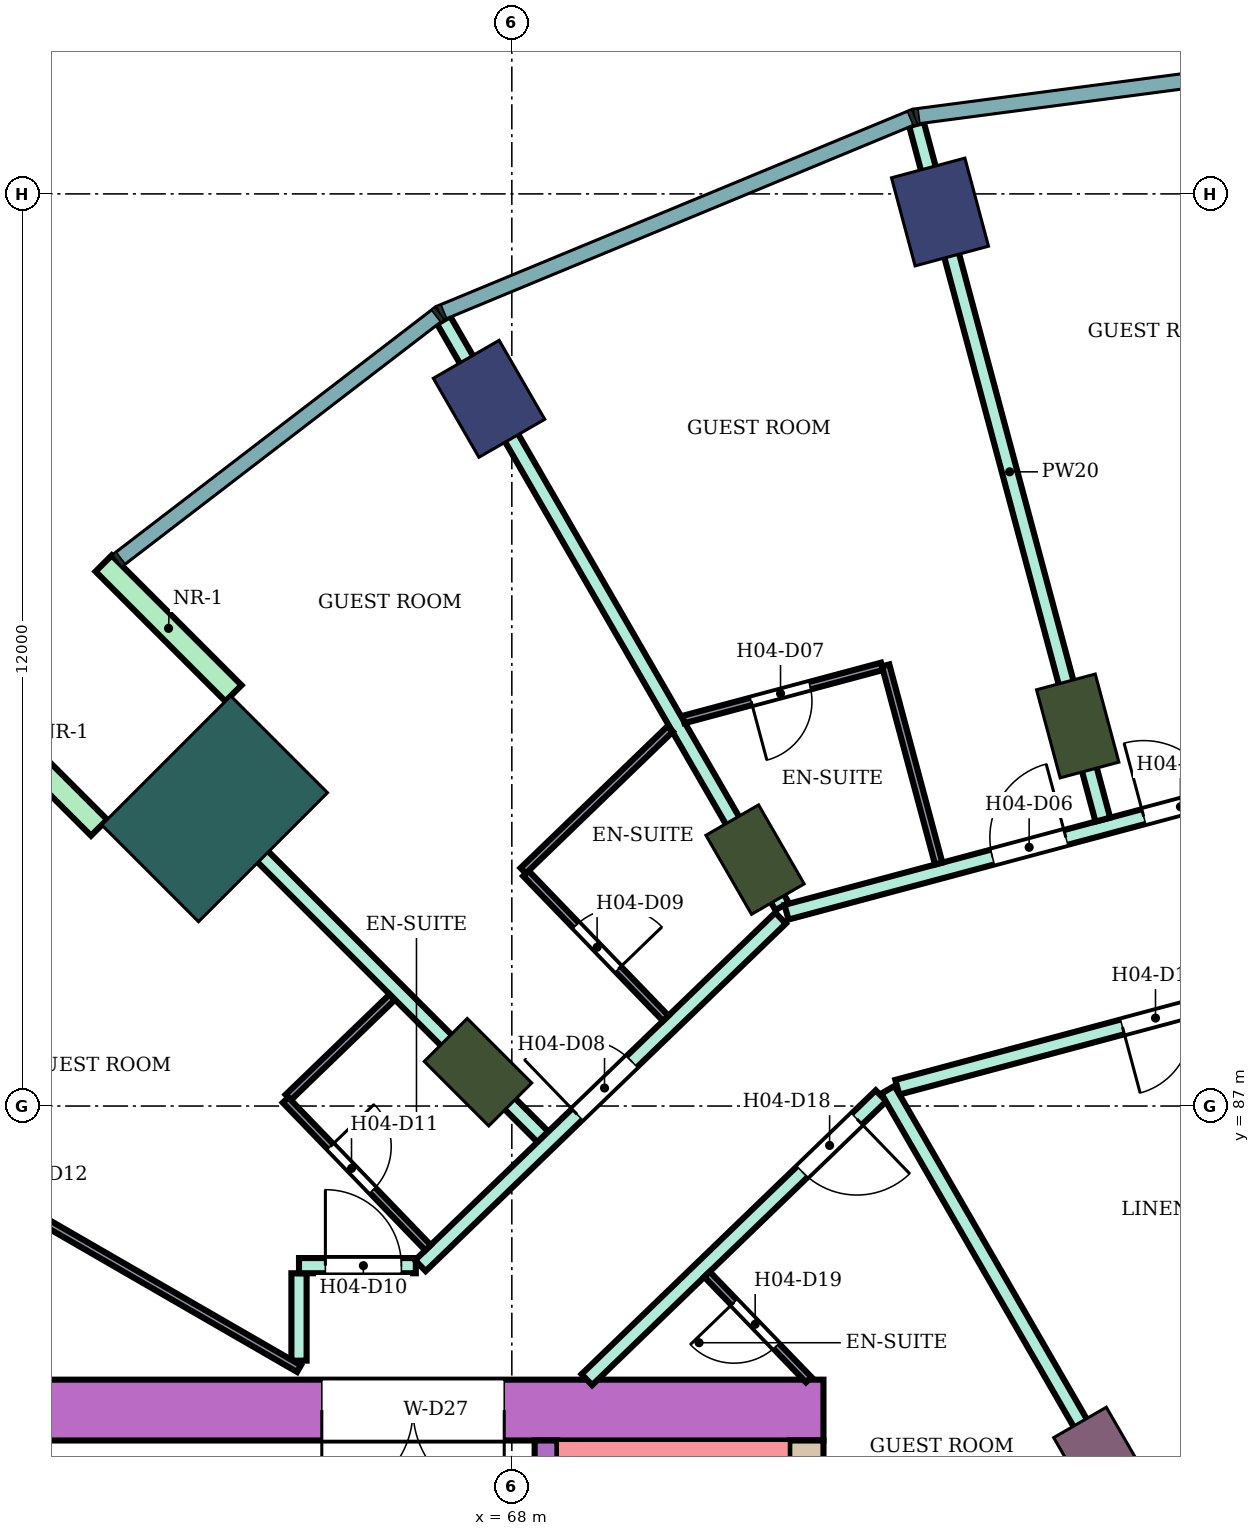
"""IFC4 building model, lengths in metres.
Left out: names, types, materials, properties, quantities, classifications, styles, units other than length and angle.
Written with IfcOpenShell. Run it as: python <this file> out.ifc"""

import sys

from ifc_helpers import new_model, si_unit, direction, frame, frame_2d, origin, origin_2d, place, context, subcontext, project, spatial, rectangle, extrude, element, fill, save


model = new_model("IFC4")
c1 = context("Model", 3, precision=1e-05, world=origin(), true_north=direction((0.0, 1.0)))
c2 = subcontext(c1, "Body", "Model", "MODEL_VIEW")
j1 = project(units=[si_unit("LENGTHUNIT", "METRE"), si_unit("PLANEANGLEUNIT", "RADIAN")], contexts=[c1])
p1 = place(None, origin())
s1 = spatial("IfcSite", under=j1, at=p1, CompositionType="ELEMENT")
p2 = place(p1, origin())
s2 = spatial("IfcBuilding", under=s1, at=p2, CompositionType="ELEMENT")
p3 = place(p2, frame((0.0, 0.0, 63.0)))
s3 = spatial("IfcBuildingStorey", under=s2, at=p3, CompositionType="ELEMENT", Elevation=63.0)
for number, where, z_axis, x_axis in (
    (1, (73.633, 98.762, 0.0), (0.0, 0.0, 1.0), (-0.259, 0.966, 0.0)),
    (2, (67.7, 96.304, 0.0), (0.0, 0.0, 1.0), (-0.5, 0.866, 0.0)),
):
    element("IfcColumn", number, at=place(p3, frame(where, z_axis=z_axis, x_axis=x_axis)), inside=s3, PredefinedType="COLUMN", context=c2, shape_type="SweptSolid", body=[
        extrude(rectangle(XDim=1.2, YDim=1.0, at=origin_2d()), origin(), (0.0, 0.0, 1.0), 3.8),
    ])
for number, where, z_axis, x_axis in (
    (3, (75.445, 92.0, 0.0), (0.0, 0.0, 1.0), (-0.259, 0.966, 0.0)),
    (4, (71.2, 90.242, 0.0), (0.0, 0.0, 1.0), (-0.5, 0.866, 0.0)),
    (5, (67.555, 87.445, 0.0), (0.0, 0.0, 1.0), (-0.707, 0.707, 0.0)),
):
    element("IfcColumn", number, at=place(p3, frame(where, z_axis=z_axis, x_axis=x_axis)), inside=s3, PredefinedType="COLUMN", context=c2, shape_type="SweptSolid", body=[
        extrude(rectangle(XDim=1.2, YDim=0.8, at=origin_2d()), origin(), (0.0, 0.0, 1.0), 3.8),
    ])
p4 = place(p3, frame((75.7, 82.448, 0.0), z_axis=(0.0, 0.0, 1.0), x_axis=(-0.5, 0.866025403784, 0.0)))
e6 = element("IfcColumn", 6, at=p4, inside=s3, PredefinedType="COLUMN", context=c2, shape_type="SweptSolid", body=[
    extrude(rectangle(XDim=0.9, YDim=0.8, at=origin_2d()), origin(), (0.0, 0.0, 1.0), 3.8),
])
p5 = place(p3, frame((64.09, 90.91, 0.0), z_axis=(0.0, 0.0, 1.0), x_axis=(-0.707106781187, 0.707106781187, 0.0)))
e7 = element("IfcColumn", 7, at=p5, inside=s3, PredefinedType="COLUMN", context=c2, shape_type="SweptSolid", body=[
    extrude(rectangle(XDim=1.8, YDim=2.4, at=origin_2d()), origin(), (0.0, 0.0, 1.0), 3.8),
])
p6 = place(p3, frame((72.1, 83.0, 0.0), z_axis=(0.0, 0.0, 1.0), x_axis=(-1.0, 0.0, 0.0)))
e8 = element("IfcWall", 8, at=p6, inside=s3, PredefinedType="SHEAR", context=c2, shape_type="SweptSolid", body=[
    extrude(rectangle(XDim=14.7, YDim=0.8, at=frame_2d((7.35, 0.0))), origin(), (0.0, 0.0, 1.0), 3.48),
])
p7 = place(p6, frame((4.2, 0.0, 0.0)))
e9 = element("IfcOpeningElement", 9, at=p7, cuts=e8, PredefinedType="OPENING", context=c2, shape_type="SweptSolid", body=[
    extrude(rectangle(XDim=2.4, YDim=2.4, at=frame_2d((1.2, 1.2))), frame((0.0, 0.41, 0.0), z_axis=(0.0, -1.0, 0.0), x_axis=(1.0, 0.0, 0.0)), (0.0, 0.0, 1.0), 0.82),
])
p8 = place(p3, frame((71.875, 82.6, 0.0), z_axis=(0.0, 0.0, 1.0), x_axis=(0.0, -1.0, 0.0)))
e10 = element("IfcWall", 10, at=p8, inside=s3, PredefinedType="SHEAR", context=c2, shape_type="SweptSolid", body=[
    extrude(rectangle(XDim=7.6, YDim=0.45, at=frame_2d((3.8, 0.0))), origin(), (0.0, 0.0, 1.0), 3.48),
])
p9 = place(p3, frame((68.45, 82.6, 0.0), z_axis=(0.0, 0.0, 1.0), x_axis=(0.0, -1.0, 0.0)))
e11 = element("IfcWall", 11, at=p9, inside=s3, PredefinedType="SHEAR", context=c2, shape_type="SweptSolid", body=[
    extrude(rectangle(XDim=7.6, YDim=0.3, at=frame_2d((3.8, 0.0))), origin(), (0.0, 0.0, 1.0), 3.48),
])
p10 = place(p9, frame((0.25, 0.0, 0.0)))
e12 = element("IfcOpeningElement", 12, at=p10, cuts=e11, PredefinedType="OPENING", context=c2, shape_type="SweptSolid", body=[
    extrude(rectangle(XDim=0.9, YDim=2.1, at=frame_2d((0.45, 1.05))), frame((0.0, 0.16, 0.0), z_axis=(0.0, -1.0, 0.0), x_axis=(1.0, 0.0, 0.0)), (0.0, 0.0, 1.0), 0.32),
])
for number, where, z_axis, x_axis in (
    (13, (64.338, 92.43, 0.0), (0.0, 0.0, 1.0), (-0.707, 0.707, 0.0)),
    (14, (62.57, 90.662, 0.0), (0.0, 0.0, 1.0), (-0.707, 0.707, 0.0)),
):
    element("IfcWall", number, at=place(p3, frame(where, z_axis=z_axis, x_axis=x_axis)), inside=s3, PredefinedType="NOTDEFINED", context=c2, shape_type="SweptSolid", body=[
        extrude(rectangle(XDim=2.416, YDim=0.3, at=frame_2d((1.208, 0.0))), origin(), (0.0, 0.0, 1.0), 3.8),
    ])
p11 = place(p3, frame((80.0, 82.604, 0.0), z_axis=(0.0, 0.0, 1.0), x_axis=(-0.965933654434, -0.258789828301, 0.0)))
e15 = element("IfcWall", 15, at=p11, inside=s3, PredefinedType="NOTDEFINED", context=c2, shape_type="SweptSolid", body=[
    extrude(rectangle(XDim=3.936, YDim=0.2, at=frame_2d((1.968, 0.0))), origin(), (0.0, 0.0, 1.0), 3.8),
])
p12 = place(p11, frame((0.468, 0.0, 0.9)))
e16 = element("IfcOpeningElement", 16, at=p12, cuts=e15, PredefinedType="OPENING", context=c2, shape_type="SweptSolid", body=[
    extrude(rectangle(XDim=3.0, YDim=2.3, at=frame_2d((1.5, 1.15))), frame((0.0, 0.11, 0.0), z_axis=(0.0, -1.0, 0.0), x_axis=(1.0, 0.0, 0.0)), (0.0, 0.0, 1.0), 0.22),
])
p13 = place(p3, frame((63.598, 91.407, 0.0), z_axis=(0.0, 0.0, 1.0), x_axis=(0.706981202484, -0.707232337591, 0.0)))
e17 = element("IfcWall", 17, at=p13, inside=s3, PredefinedType="PARTITIONING", context=c2, shape_type="SweptSolid", body=[
    extrude(rectangle(XDim=6.805, YDim=0.2, at=frame_2d((3.402, 0.0))), origin(), (0.0, 0.0, 1.0), 3.35),
])
p14 = place(p3, frame((65.2, 83.65, 0.0), z_axis=(0.0, 0.0, 1.0), x_axis=(0.0, 1.0, 0.0)))
e18 = element("IfcWall", 18, at=p14, inside=s3, PredefinedType="PARTITIONING", context=c2, shape_type="SweptSolid", body=[
    extrude(rectangle(XDim=1.15, YDim=0.2, at=frame_2d((0.575, 0.0))), origin(), (0.0, 0.0, 1.0), 3.35),
])
p15 = place(p3, frame((65.2, 84.9, 0.0), z_axis=(0.0, 0.0, 1.0), x_axis=(1.0, 0.0, 0.0)))
e19 = element("IfcWall", 19, at=p15, inside=s3, PredefinedType="PARTITIONING", context=c2, shape_type="SweptSolid", body=[
    extrude(rectangle(XDim=1.537, YDim=0.2, at=frame_2d((0.769, 0.0))), origin(), (0.0, 0.0, 1.0), 3.35),
])
p16 = place(p15, frame((0.347, 0.0, 0.0)))
e20 = element("IfcOpeningElement", 20, at=p16, cuts=e19, PredefinedType="OPENING", context=c2, shape_type="SweptSolid", body=[
    extrude(rectangle(XDim=1.0, YDim=2.1, at=frame_2d((0.5, 1.05))), frame((0.0, 0.11, 0.0), z_axis=(0.0, -1.0, 0.0), x_axis=(1.0, 0.0, 0.0)), (0.0, 0.0, 1.0), 0.22),
])
p17 = place(p3, frame((66.797, 84.9, 0.0), z_axis=(0.0, 0.0, 1.0), x_axis=(0.719692092412, 0.694293376116, 0.0)))
e21 = element("IfcWall", 21, at=p17, inside=s3, PredefinedType="PARTITIONING", context=c2, shape_type="SweptSolid", body=[
    extrude(rectangle(XDim=6.584, YDim=0.2, at=frame_2d((3.292, 0.0))), origin(), (0.0, 0.0, 1.0), 3.35),
])
p18 = place(p17, frame((2.866, 0.0, 0.0)))
e22 = element("IfcOpeningElement", 22, at=p18, cuts=e21, PredefinedType="OPENING", context=c2, shape_type="SweptSolid", body=[
    extrude(rectangle(XDim=1.0, YDim=2.1, at=frame_2d((0.5, 1.05))), frame((0.0, 0.11, 0.0), z_axis=(0.0, -1.0, 0.0), x_axis=(1.0, 0.0, 0.0)), (0.0, 0.0, 1.0), 0.22),
])
p19 = place(p3, frame((67.101, 97.342, 0.0), z_axis=(0.0, 0.0, 1.0), x_axis=(0.499932813297, -0.866064190571, 0.0)))
e23 = element("IfcWall", 23, at=p19, inside=s3, PredefinedType="PARTITIONING", context=c2, shape_type="SweptSolid", body=[
    extrude(rectangle(XDim=8.908, YDim=0.2, at=frame_2d((4.454, 0.0))), origin(), (0.0, 0.0, 1.0), 3.35),
])
p20 = place(p3, frame((68.987, 83.4, 0.0), z_axis=(0.0, 0.0, 1.0), x_axis=(0.719591503389, 0.694397629784, 0.0)))
e24 = element("IfcWall", 24, at=p20, inside=s3, PredefinedType="PARTITIONING", context=c2, shape_type="SweptSolid", body=[
    extrude(rectangle(XDim=5.378, YDim=0.2, at=frame_2d((2.689, 0.0))), origin(), (0.0, 0.0, 1.0), 3.35),
])
p21 = place(p20, frame((3.938, 0.0, 0.0)))
e25 = element("IfcOpeningElement", 25, at=p21, cuts=e24, PredefinedType="OPENING", context=c2, shape_type="SweptSolid", body=[
    extrude(rectangle(XDim=1.0, YDim=2.1, at=frame_2d((0.5, 1.05))), frame((0.0, 0.11, 0.0), z_axis=(0.0, -1.0, 0.0), x_axis=(1.0, 0.0, 0.0)), (0.0, 0.0, 1.0), 0.22),
])
p22 = place(p3, frame((71.614, 89.55, 0.0), z_axis=(0.0, 0.0, 1.0), x_axis=(0.965982156828, 0.258608725086, 0.0)))
e26 = element("IfcWall", 26, at=p22, inside=s3, PredefinedType="PARTITIONING", context=c2, shape_type="SweptSolid", body=[
    extrude(rectangle(XDim=8.592, YDim=0.2, at=frame_2d((4.296, 0.0))), origin(), (0.0, 0.0, 1.0), 3.35),
])
p23 = place(p22, frame((4.865, 0.0, 0.0)))
e27 = element("IfcOpeningElement", 27, at=p23, cuts=e26, PredefinedType="OPENING", context=c2, shape_type="SweptSolid", body=[
    extrude(rectangle(XDim=1.0, YDim=2.1, at=frame_2d((0.5, 1.05))), frame((0.0, 0.11, 0.0), z_axis=(0.0, -1.0, 0.0), x_axis=(1.0, 0.0, 0.0)), (0.0, 0.0, 1.0), 0.22),
])
p24 = place(p22, frame((2.804, 0.0, 0.0)))
e28 = element("IfcOpeningElement", 28, at=p24, cuts=e26, PredefinedType="OPENING", context=c2, shape_type="SweptSolid", body=[
    extrude(rectangle(XDim=1.0, YDim=2.1, at=frame_2d((0.5, 1.05))), frame((0.0, 0.11, 0.0), z_axis=(0.0, -1.0, 0.0), x_axis=(1.0, 0.0, 0.0)), (0.0, 0.0, 1.0), 0.22),
])
p25 = place(p3, frame((73.071, 87.247, 0.0), z_axis=(0.0, 0.0, 1.0), x_axis=(0.965914318977, 0.258861987157, 0.0)))
e29 = element("IfcWall", 29, at=p25, inside=s3, PredefinedType="PARTITIONING", context=c2, shape_type="SweptSolid", body=[
    extrude(rectangle(XDim=7.043, YDim=0.2, at=frame_2d((3.521, 0.0))), origin(), (0.0, 0.0, 1.0), 3.35),
])
p26 = place(p25, frame((3.067, 0.0, 0.0)))
e30 = element("IfcOpeningElement", 30, at=p26, cuts=e29, PredefinedType="OPENING", context=c2, shape_type="SweptSolid", body=[
    extrude(rectangle(XDim=0.9, YDim=2.1, at=frame_2d((0.45, 1.05))), frame((0.0, 0.11, 0.0), z_axis=(0.0, -1.0, 0.0), x_axis=(1.0, 0.0, 0.0)), (0.0, 0.0, 1.0), 0.22),
])
p27 = place(p3, frame((72.948, 87.214, 0.0), z_axis=(0.0, 0.0, 1.0), x_axis=(0.499927021214, -0.866067534006, 0.0)))
e31 = element("IfcWall", 31, at=p27, inside=s3, PredefinedType="PARTITIONING", context=c2, shape_type="SweptSolid", body=[
    extrude(rectangle(XDim=6.405, YDim=0.2, at=frame_2d((3.203, 0.0))), origin(), (0.0, 0.0, 1.0), 3.35),
])
p28 = place(p3, frame((73.323, 99.919, 0.0), z_axis=(0.0, 0.0, 1.0), x_axis=(0.258817230439, -0.965926312525, 0.0)))
e32 = element("IfcWall", 32, at=p28, inside=s3, PredefinedType="PARTITIONING", context=c2, shape_type="SweptSolid", body=[
    extrude(rectangle(XDim=9.474, YDim=0.2, at=frame_2d((4.737, 0.0))), origin(), (0.0, 0.0, 1.0), 3.35),
])
p29 = place(p3, frame((57.659, 87.899, 0.0), z_axis=(0.0, 0.0, 1.0), x_axis=(0.86602264145, -0.500004784474, 0.0)))
e33 = element("IfcWall", 33, at=p29, inside=s3, PredefinedType="PARTITIONING", context=c2, shape_type="SweptSolid", body=[
    extrude(rectangle(XDim=8.708, YDim=0.1, at=frame_2d((4.354, 0.0))), origin(), (0.0, 0.0, 1.0), 3.35),
])
p30 = place(p29, frame((3.929, 0.0, 0.0)))
e34 = element("IfcOpeningElement", 34, at=p30, cuts=e33, PredefinedType="OPENING", context=c2, shape_type="SweptSolid", body=[
    extrude(rectangle(XDim=0.9, YDim=2.1, at=frame_2d((0.45, 1.05))), frame((0.0, 0.06, 0.0), z_axis=(0.0, -1.0, 0.0), x_axis=(1.0, 0.0, 0.0)), (0.0, 0.0, 1.0), 0.12),
])
p31 = place(p3, frame((65.059, 87.114, 0.0), z_axis=(0.0, 0.0, 1.0), x_axis=(0.719715847356, 0.694268751324, 0.0)))
e35 = element("IfcWall", 35, at=p31, inside=s3, PredefinedType="PARTITIONING", context=c2, shape_type="SweptSolid", body=[
    extrude(rectangle(XDim=1.9, YDim=0.1, at=frame_2d((0.95, 0.0))), origin(), (0.0, 0.0, 1.0), 3.35),
])
p32 = place(p3, frame((65.023, 87.079, 0.0), z_axis=(0.0, 0.0, 1.0), x_axis=(0.694287838235, -0.719697434815, 0.0)))
e36 = element("IfcWall", 36, at=p32, inside=s3, PredefinedType="PARTITIONING", context=c2, shape_type="SweptSolid", body=[
    extrude(rectangle(XDim=2.7, YDim=0.1, at=frame_2d((1.35, 0.0))), origin(), (0.0, 0.0, 1.0), 3.35),
])
p33 = place(p32, frame((0.85, 0.0, 0.0)))
e37 = element("IfcOpeningElement", 37, at=p33, cuts=e36, PredefinedType="OPENING", context=c2, shape_type="SweptSolid", body=[
    extrude(rectangle(XDim=0.8, YDim=2.1, at=frame_2d((0.4, 1.05))), frame((0.0, 0.06, 0.0), z_axis=(0.0, -1.0, 0.0), x_axis=(1.0, 0.0, 0.0)), (0.0, 0.0, 1.0), 0.12),
])
p34 = place(p3, frame((68.185, 90.06, 0.0), z_axis=(0.0, 0.0, 1.0), x_axis=(0.69446127412, -0.719530081892, 0.0)))
e38 = element("IfcWall", 38, at=p34, inside=s3, PredefinedType="PARTITIONING", context=c2, shape_type="SweptSolid", body=[
    extrude(rectangle(XDim=2.649, YDim=0.1, at=frame_2d((1.324, 0.0))), origin(), (0.0, 0.0, 1.0), 3.35),
])
p35 = place(p34, frame((0.95, 0.0, 0.0)))
e39 = element("IfcOpeningElement", 39, at=p35, cuts=e38, PredefinedType="OPENING", context=c2, shape_type="SweptSolid", body=[
    extrude(rectangle(XDim=0.8, YDim=2.1, at=frame_2d((0.4, 1.05))), frame((0.0, 0.06, 0.0), z_axis=(0.0, -1.0, 0.0), x_axis=(1.0, 0.0, 0.0)), (0.0, 0.0, 1.0), 0.12),
])
p36 = place(p3, frame((68.15, 90.096, 0.0), z_axis=(0.0, 0.0, 1.0), x_axis=(0.719669144226, 0.694317163009, 0.0)))
e40 = element("IfcWall", 40, at=p36, inside=s3, PredefinedType="PARTITIONING", context=c2, shape_type="SweptSolid", body=[
    extrude(rectangle(XDim=2.687, YDim=0.1, at=frame_2d((1.343, 0.0))), origin(), (0.0, 0.0, 1.0), 3.35),
])
p37 = place(p3, frame((70.258, 92.085, 0.0), z_axis=(0.0, 0.0, 1.0), x_axis=(0.965948051503, 0.258736085224, 0.0)))
e41 = element("IfcWall", 41, at=p37, inside=s3, PredefinedType="PARTITIONING", context=c2, shape_type="SweptSolid", body=[
    extrude(rectangle(XDim=2.703, YDim=0.1, at=frame_2d((1.352, 0.0))), origin(), (0.0, 0.0, 1.0), 3.35),
])
p38 = place(p37, frame((0.922, 0.0, 0.0)))
e42 = element("IfcOpeningElement", 42, at=p38, cuts=e41, PredefinedType="OPENING", context=c2, shape_type="SweptSolid", body=[
    extrude(rectangle(XDim=0.8, YDim=2.1, at=frame_2d((0.4, 1.05))), frame((0.0, 0.06, 0.0), z_axis=(0.0, -1.0, 0.0), x_axis=(1.0, 0.0, 0.0)), (0.0, 0.0, 1.0), 0.12),
])
p39 = place(p3, frame((70.567, 84.786, 0.0), z_axis=(0.0, 0.0, 1.0), x_axis=(0.694447472534, -0.719543402368, 0.0)))
e43 = element("IfcWall", 43, at=p39, inside=s3, PredefinedType="PARTITIONING", context=c2, shape_type="SweptSolid", body=[
    extrude(rectangle(XDim=1.926, YDim=0.1, at=frame_2d((0.963, 0.0))), origin(), (0.0, 0.0, 1.0), 3.35),
])
p40 = place(p39, frame((0.513, 0.0, 0.0)))
e44 = element("IfcOpeningElement", 44, at=p40, cuts=e43, PredefinedType="OPENING", context=c2, shape_type="SweptSolid", body=[
    extrude(rectangle(XDim=0.8, YDim=2.1, at=frame_2d((0.4, 1.05))), frame((0.0, 0.06, 0.0), z_axis=(0.0, -1.0, 0.0), x_axis=(1.0, 0.0, 0.0)), (0.0, 0.0, 1.0), 0.12),
])
p41 = place(p3, frame((72.918, 92.797, 0.0), z_axis=(0.0, 0.0, 1.0), x_axis=(0.25867580527, -0.965964195904, 0.0)))
e45 = element("IfcWall", 45, at=p41, inside=s3, PredefinedType="PARTITIONING", context=c2, shape_type="SweptSolid", body=[
    extrude(rectangle(XDim=2.699, YDim=0.1, at=frame_2d((1.35, 0.0))), origin(), (0.0, 0.0, 1.0), 3.35),
])
p42 = place(p12, origin())
e46 = element("IfcWindow", 46, at=p42, inside=s3, PartitioningType="SINGLE_PANEL", PredefinedType="WINDOW", context=c2, shape_type="SweptSolid", body=[
    extrude(rectangle(XDim=3.0, YDim=2.3, at=frame_2d((1.5, 1.15))), frame((0.0, 0.03, 0.0), z_axis=(0.0, -1.0, 0.0), x_axis=(1.0, 0.0, 0.0)), (0.0, 0.0, 1.0), 0.06),
])
fill(e16, e46)
p43 = place(p23, origin())
e47 = element("IfcDoor", 47, at=p43, inside=s3, OperationType="SINGLE_SWING_LEFT", PredefinedType="DOOR", context=c2, shape_type="SweptSolid", body=[
    extrude(rectangle(XDim=1.0, YDim=2.1, at=frame_2d((0.5, 1.05))), frame((0.0, 0.025, 0.0), z_axis=(0.0, -1.0, 0.0), x_axis=(1.0, 0.0, 0.0)), (0.0, 0.0, 1.0), 0.05),
])
fill(e27, e47)
p44 = place(p24, origin())
e48 = element("IfcDoor", 48, at=p44, inside=s3, OperationType="SINGLE_SWING_RIGHT", PredefinedType="DOOR", context=c2, shape_type="SweptSolid", body=[
    extrude(rectangle(XDim=1.0, YDim=2.1, at=frame_2d((0.5, 1.05))), frame((0.0, 0.025, 0.0), z_axis=(0.0, -1.0, 0.0), x_axis=(1.0, 0.0, 0.0)), (0.0, 0.0, 1.0), 0.05),
])
fill(e28, e48)
p45 = place(p38, frame((0.8, 0.0, 0.0), z_axis=(0.0, 0.0, 1.0), x_axis=(-1.0, 0.0, 0.0)))
e49 = element("IfcDoor", 49, at=p45, inside=s3, OperationType="SINGLE_SWING_RIGHT", PredefinedType="DOOR", context=c2, shape_type="SweptSolid", body=[
    extrude(rectangle(XDim=0.8, YDim=2.1, at=frame_2d((0.4, 1.05))), frame((0.0, 0.025, 0.0), z_axis=(0.0, -1.0, 0.0), x_axis=(1.0, 0.0, 0.0)), (0.0, 0.0, 1.0), 0.05),
])
fill(e42, e49)
p46 = place(p18, origin())
e50 = element("IfcDoor", 50, at=p46, inside=s3, OperationType="SINGLE_SWING_LEFT", PredefinedType="DOOR", context=c2, shape_type="SweptSolid", body=[
    extrude(rectangle(XDim=1.0, YDim=2.1, at=frame_2d((0.5, 1.05))), frame((0.0, 0.025, 0.0), z_axis=(0.0, -1.0, 0.0), x_axis=(1.0, 0.0, 0.0)), (0.0, 0.0, 1.0), 0.05),
])
fill(e22, e50)
p47 = place(p35, origin())
e51 = element("IfcDoor", 51, at=p47, inside=s3, OperationType="SINGLE_SWING_RIGHT", PredefinedType="DOOR", context=c2, shape_type="SweptSolid", body=[
    extrude(rectangle(XDim=0.8, YDim=2.1, at=frame_2d((0.4, 1.05))), frame((0.0, 0.025, 0.0), z_axis=(0.0, -1.0, 0.0), x_axis=(1.0, 0.0, 0.0)), (0.0, 0.0, 1.0), 0.05),
])
fill(e39, e51)
p48 = place(p16, origin())
e52 = element("IfcDoor", 52, at=p48, inside=s3, OperationType="SINGLE_SWING_LEFT", PredefinedType="DOOR", context=c2, shape_type="SweptSolid", body=[
    extrude(rectangle(XDim=1.0, YDim=2.1, at=frame_2d((0.5, 1.05))), frame((0.0, 0.025, 0.0), z_axis=(0.0, -1.0, 0.0), x_axis=(1.0, 0.0, 0.0)), (0.0, 0.0, 1.0), 0.05),
])
fill(e20, e52)
p49 = place(p33, origin())
e53 = element("IfcDoor", 53, at=p49, inside=s3, OperationType="SINGLE_SWING_LEFT", PredefinedType="DOOR", context=c2, shape_type="SweptSolid", body=[
    extrude(rectangle(XDim=0.8, YDim=2.1, at=frame_2d((0.4, 1.05))), frame((0.0, 0.025, 0.0), z_axis=(0.0, -1.0, 0.0), x_axis=(1.0, 0.0, 0.0)), (0.0, 0.0, 1.0), 0.05),
])
fill(e37, e53)
p50 = place(p26, frame((0.9, 0.0, 0.0), z_axis=(0.0, 0.0, 1.0), x_axis=(-1.0, 0.0, 0.0)))
e54 = element("IfcDoor", 54, at=p50, inside=s3, OperationType="SINGLE_SWING_RIGHT", PredefinedType="DOOR", context=c2, shape_type="SweptSolid", body=[
    extrude(rectangle(XDim=0.9, YDim=2.1, at=frame_2d((0.45, 1.05))), frame((0.0, 0.025, 0.0), z_axis=(0.0, -1.0, 0.0), x_axis=(1.0, 0.0, 0.0)), (0.0, 0.0, 1.0), 0.05),
])
fill(e30, e54)
p51 = place(p21, frame((1.0, 0.0, 0.0), z_axis=(0.0, 0.0, 1.0), x_axis=(-1.0, 0.0, 0.0)))
e55 = element("IfcDoor", 55, at=p51, inside=s3, OperationType="SINGLE_SWING_LEFT", PredefinedType="DOOR", context=c2, shape_type="SweptSolid", body=[
    extrude(rectangle(XDim=1.0, YDim=2.1, at=frame_2d((0.5, 1.05))), frame((0.0, 0.025, 0.0), z_axis=(0.0, -1.0, 0.0), x_axis=(1.0, 0.0, 0.0)), (0.0, 0.0, 1.0), 0.05),
])
fill(e25, e55)
p52 = place(p40, frame((0.8, 0.0, 0.0), z_axis=(0.0, 0.0, 1.0), x_axis=(-1.0, 0.0, 0.0)))
e56 = element("IfcDoor", 56, at=p52, inside=s3, OperationType="SINGLE_SWING_RIGHT", PredefinedType="DOOR", context=c2, shape_type="SweptSolid", body=[
    extrude(rectangle(XDim=0.8, YDim=2.1, at=frame_2d((0.4, 1.05))), frame((0.0, 0.025, 0.0), z_axis=(0.0, -1.0, 0.0), x_axis=(1.0, 0.0, 0.0)), (0.0, 0.0, 1.0), 0.05),
])
fill(e44, e56)
p53 = place(p7, origin())
e57 = element("IfcDoor", 57, at=p53, inside=s3, OperationType="DOUBLE_DOOR_SINGLE_SWING", PredefinedType="DOOR", context=c2, shape_type="SweptSolid", body=[
    extrude(rectangle(XDim=2.4, YDim=2.4, at=frame_2d((1.2, 1.2))), frame((0.0, 0.025, 0.0), z_axis=(0.0, -1.0, 0.0), x_axis=(1.0, 0.0, 0.0)), (0.0, 0.0, 1.0), 0.05),
])
fill(e9, e57)
save(model, sys.argv[1])
